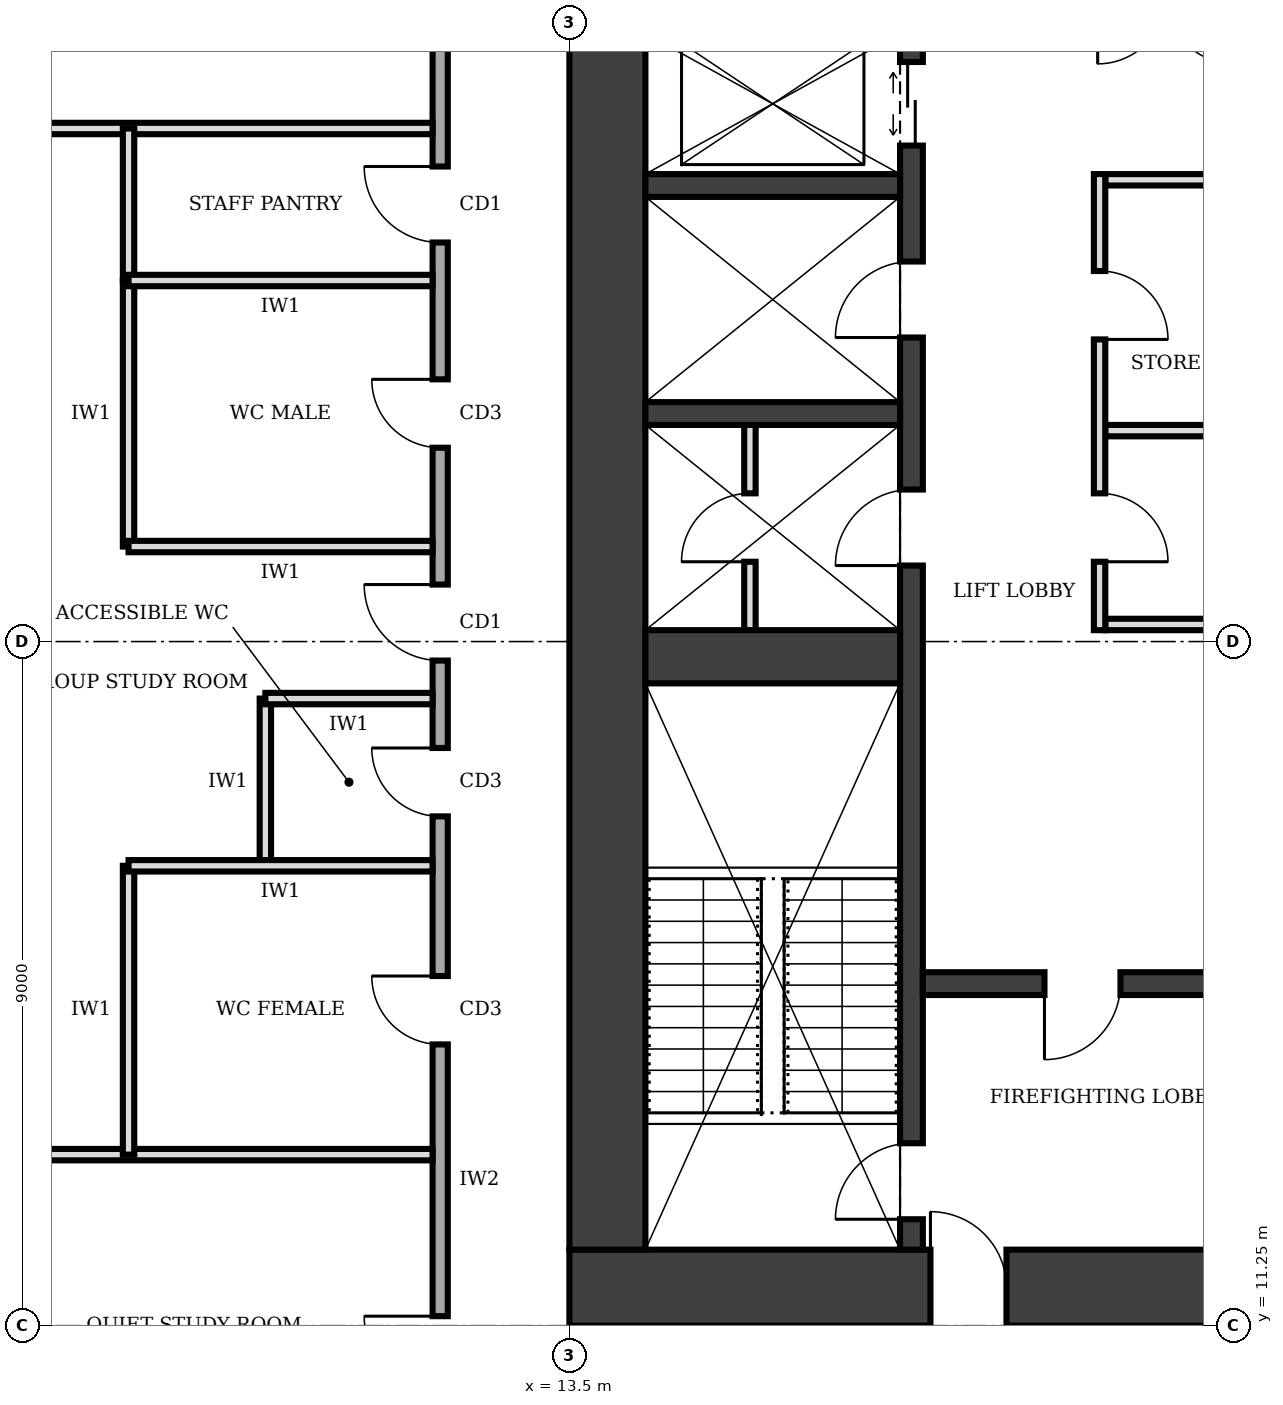
"""IFC4 building model, lengths in metres.
Left out: names, types, materials, properties, quantities, classifications, styles, units other than length and angle.
Written with IfcOpenShell. Run it as: python <this file> out.ifc"""

import sys

from ifc_helpers import new_model, si_unit, direction, frame, frame_2d, origin, place, context, subcontext, project, spatial, rectangle, extrude, element, fill, save


model = new_model("IFC4")
c1 = context("Model", 3, precision=1e-05, world=origin(), true_north=direction((0.0, 1.0)))
c2 = subcontext(c1, "Body", "Model", "MODEL_VIEW")
j1 = project(units=[si_unit("LENGTHUNIT", "METRE"), si_unit("PLANEANGLEUNIT", "RADIAN")], contexts=[c1])
p1 = place(None, origin())
s1 = spatial("IfcSite", under=j1, at=p1, CompositionType="ELEMENT")
p2 = place(p1, origin())
s2 = spatial("IfcBuilding", under=s1, at=p2, CompositionType="ELEMENT")
p3 = place(p2, frame((0.0, 0.0, 269.0)))
s3 = spatial("IfcBuildingStorey", under=s2, at=p3, CompositionType="ELEMENT", Elevation=269.0)
p4 = place(p3, frame((13.5, 11.75, 0.0), z_axis=(0.0, 0.0, 1.0), x_axis=(1.0, 0.0, 0.0)))
e1 = element("IfcWall", 1, at=p4, inside=s3, PredefinedType="SHEAR", context=c2, shape_type="SweptSolid", body=[
    extrude(rectangle(XDim=13.5, YDim=1.0, at=frame_2d((6.75, 0.0))), origin(), (0.0, 0.0, 1.0), 4.0),
])
p5 = place(p4, frame((4.75, 0.0, 0.0)))
e2 = element("IfcOpeningElement", 2, at=p5, cuts=e1, PredefinedType="OPENING", context=c2, shape_type="SweptSolid", body=[
    extrude(rectangle(XDim=1.0, YDim=2.1, at=frame_2d((0.5, 1.05))), frame((0.0, 0.51, 0.0), z_axis=(0.0, -1.0, 0.0), x_axis=(1.0, 0.0, 0.0)), (0.0, 0.0, 1.0), 1.02),
])
p6 = place(p3, frame((14.0, 28.25, 0.0), z_axis=(0.0, 0.0, 1.0), x_axis=(0.0, -1.0, 0.0)))
e3 = element("IfcWall", 3, at=p6, inside=s3, PredefinedType="SHEAR", context=c2, shape_type="SweptSolid", body=[
    extrude(rectangle(XDim=16.0, YDim=1.0, at=frame_2d((8.0, 0.0))), origin(), (0.0, 0.0, 1.0), 4.0),
])
p7 = place(p3, frame((18.0, 12.25, 0.0), z_axis=(0.0, 0.0, 1.0), x_axis=(0.0, 1.0, 0.0)))
e4 = element("IfcWall", 4, at=p7, inside=s3, PredefinedType="SHEAR", context=c2, shape_type="SweptSolid", body=[
    extrude(rectangle(XDim=16.0, YDim=0.3, at=frame_2d((8.0, 0.0))), origin(), (0.0, 0.0, 1.0), 4.0),
])
p8 = place(p7, frame((0.4, 0.0, 0.0)))
e5 = element("IfcOpeningElement", 5, at=p8, cuts=e4, PredefinedType="OPENING", context=c2, shape_type="SweptSolid", body=[
    extrude(rectangle(XDim=1.0, YDim=2.1, at=frame_2d((0.5, 1.05))), frame((0.0, 0.16, 0.0), z_axis=(0.0, -1.0, 0.0), x_axis=(1.0, 0.0, 0.0)), (0.0, 0.0, 1.0), 0.32),
])
p9 = place(p7, frame((14.525, 0.0, 0.0)))
e6 = element("IfcOpeningElement", 6, at=p9, cuts=e4, PredefinedType="OPENING", context=c2, shape_type="SweptSolid", body=[
    extrude(rectangle(XDim=1.1, YDim=2.1, at=frame_2d((0.55, 1.05))), frame((0.0, 0.16, 0.0), z_axis=(0.0, -1.0, 0.0), x_axis=(1.0, 0.0, 0.0)), (0.0, 0.0, 1.0), 0.32),
])
p10 = place(p7, frame((9.0, 0.0, 0.0)))
e7 = element("IfcOpeningElement", 7, at=p10, cuts=e4, PredefinedType="OPENING", context=c2, shape_type="SweptSolid", body=[
    extrude(rectangle(XDim=1.0, YDim=2.1, at=frame_2d((0.5, 1.05))), frame((0.0, 0.16, 0.0), z_axis=(0.0, -1.0, 0.0), x_axis=(1.0, 0.0, 0.0)), (0.0, 0.0, 1.0), 0.32),
])
p11 = place(p7, frame((12.0, 0.0, 0.0)))
e8 = element("IfcOpeningElement", 8, at=p11, cuts=e4, PredefinedType="OPENING", context=c2, shape_type="SweptSolid", body=[
    extrude(rectangle(XDim=1.0, YDim=2.1, at=frame_2d((0.5, 1.05))), frame((0.0, 0.16, 0.0), z_axis=(0.0, -1.0, 0.0), x_axis=(1.0, 0.0, 0.0)), (0.0, 0.0, 1.0), 0.32),
])
p12 = place(p3, frame((14.5, 20.05, 0.0), z_axis=(0.0, 0.0, 1.0), x_axis=(1.0, 0.0, 0.0)))
e9 = element("IfcWall", 9, at=p12, inside=s3, PredefinedType="SHEAR", context=c2, shape_type="SweptSolid", body=[
    extrude(rectangle(XDim=3.35, YDim=0.7, at=frame_2d((1.675, 0.0))), origin(), (0.0, 0.0, 1.0), 4.0),
])
p13 = place(p3, frame((18.15, 15.75, 0.0), z_axis=(0.0, 0.0, 1.0), x_axis=(1.0, 0.0, 0.0)))
e10 = element("IfcWall", 10, at=p13, inside=s3, PredefinedType="SHEAR", context=c2, shape_type="SweptSolid", body=[
    extrude(rectangle(XDim=4.2, YDim=0.3, at=frame_2d((2.1, 0.0))), origin(), (0.0, 0.0, 1.0), 4.0),
])
p14 = place(p13, frame((1.6, 0.0, 0.0)))
e11 = element("IfcOpeningElement", 11, at=p14, cuts=e10, PredefinedType="OPENING", context=c2, shape_type="SweptSolid", body=[
    extrude(rectangle(XDim=1.0, YDim=2.1, at=frame_2d((0.5, 1.05))), frame((0.0, 0.16, 0.0), z_axis=(0.0, -1.0, 0.0), x_axis=(1.0, 0.0, 0.0)), (0.0, 0.0, 1.0), 0.32),
])
for number, where, z_axis, x_axis in (
    (12, (14.5, 23.25, 0.0), (0.0, 0.0, 1.0), (1.0, 0.0, 0.0)),
    (13, (14.5, 26.25, 0.0), (0.0, 0.0, 1.0), (1.0, 0.0, 0.0)),
):
    element("IfcWall", number, at=place(p3, frame(where, z_axis=z_axis, x_axis=x_axis)), inside=s3, PredefinedType="SHEAR", context=c2, shape_type="SweptSolid", body=[
        extrude(rectangle(XDim=3.35, YDim=0.3, at=frame_2d((1.675, 0.0))), origin(), (0.0, 0.0, 1.0), 4.0),
    ])
p15 = place(p3, frame((20.475, 20.4, 0.0), z_axis=(0.0, 0.0, 1.0), x_axis=(0.0, 1.0, 0.0)))
e14 = element("IfcWall", 14, at=p15, inside=s3, PredefinedType="PARTITIONING", context=c2, shape_type="SweptSolid", body=[
    extrude(rectangle(XDim=6.0, YDim=0.15, at=frame_2d((3.0, 0.0))), origin(), (0.0, 0.0, 1.0), 3.75),
])
p16 = place(p15, frame((0.9, 0.0, 0.0)))
e15 = element("IfcOpeningElement", 15, at=p16, cuts=e14, PredefinedType="OPENING", context=c2, shape_type="SweptSolid", body=[
    extrude(rectangle(XDim=0.9, YDim=2.1, at=frame_2d((0.45, 1.05))), frame((0.0, 0.085, 0.0), z_axis=(0.0, -1.0, 0.0), x_axis=(1.0, 0.0, 0.0)), (0.0, 0.0, 1.0), 0.17),
])
p17 = place(p15, frame((3.825, 0.0, 0.0)))
e16 = element("IfcOpeningElement", 16, at=p17, cuts=e14, PredefinedType="OPENING", context=c2, shape_type="SweptSolid", body=[
    extrude(rectangle(XDim=0.9, YDim=2.1, at=frame_2d((0.45, 1.05))), frame((0.0, 0.085, 0.0), z_axis=(0.0, -1.0, 0.0), x_axis=(1.0, 0.0, 0.0)), (0.0, 0.0, 1.0), 0.17),
])
for number, where, z_axis, x_axis in (
    (17, (20.55, 20.475, 0.0), (0.0, 0.0, 1.0), (1.0, 0.0, 0.0)),
    (18, (20.55, 23.025, 0.0), (0.0, 0.0, 1.0), (1.0, 0.0, 0.0)),
    (19, (20.55, 26.325, 0.0), (0.0, 0.0, 1.0), (1.0, 0.0, 0.0)),
):
    element("IfcWall", number, at=place(p3, frame(where, z_axis=z_axis, x_axis=x_axis)), inside=s3, PredefinedType="PARTITIONING", context=c2, shape_type="SweptSolid", body=[
        extrude(rectangle(XDim=1.8, YDim=0.15, at=frame_2d((0.9, 0.0))), origin(), (0.0, 0.0, 1.0), 3.75),
    ])
p18 = place(p3, frame((15.875, 20.4, 0.0), z_axis=(0.0, 0.0, 1.0), x_axis=(0.0, 1.0, 0.0)))
e20 = element("IfcWall", 20, at=p18, inside=s3, PredefinedType="PARTITIONING", context=c2, shape_type="SweptSolid", body=[
    extrude(rectangle(XDim=2.7, YDim=0.15, at=frame_2d((1.35, 0.0))), origin(), (0.0, 0.0, 1.0), 3.75),
])
p19 = place(p18, frame((0.9, 0.0, 0.0)))
e21 = element("IfcOpeningElement", 21, at=p19, cuts=e20, PredefinedType="OPENING", context=c2, shape_type="SweptSolid", body=[
    extrude(rectangle(XDim=0.9, YDim=2.1, at=frame_2d((0.45, 1.05))), frame((0.0, 0.085, 0.0), z_axis=(0.0, -1.0, 0.0), x_axis=(1.0, 0.0, 0.0)), (0.0, 0.0, 1.0), 0.17),
])
p20 = place(p3, frame((11.8, 32.05, 0.0), z_axis=(0.0, 0.0, 1.0), x_axis=(0.0, -1.0, 0.0)))
e22 = element("IfcWall", 22, at=p20, inside=s3, PredefinedType="SOLIDWALL", context=c2, shape_type="SweptSolid", body=[
    extrude(rectangle(XDim=23.8, YDim=0.2, at=frame_2d((11.9, 0.0))), origin(), (0.0, 0.0, 1.0), 3.75),
])
p21 = place(p20, frame((20.675, 0.0, 0.0)))
e23 = element("IfcOpeningElement", 23, at=p21, cuts=e22, PredefinedType="OPENING", context=c2, shape_type="SweptSolid", body=[
    extrude(rectangle(XDim=1.0, YDim=2.1, at=frame_2d((0.5, 1.05))), frame((0.0, 0.11, 0.0), z_axis=(0.0, -1.0, 0.0), x_axis=(1.0, 0.0, 0.0)), (0.0, 0.0, 1.0), 0.22),
])
p22 = place(p20, frame((16.2, 0.0, 0.0)))
e24 = element("IfcOpeningElement", 24, at=p22, cuts=e22, PredefinedType="OPENING", context=c2, shape_type="SweptSolid", body=[
    extrude(rectangle(XDim=0.9, YDim=2.1, at=frame_2d((0.45, 1.05))), frame((0.0, 0.11, 0.0), z_axis=(0.0, -1.0, 0.0), x_axis=(1.0, 0.0, 0.0)), (0.0, 0.0, 1.0), 0.22),
])
p23 = place(p20, frame((13.2, 0.0, 0.0)))
e25 = element("IfcOpeningElement", 25, at=p23, cuts=e22, PredefinedType="OPENING", context=c2, shape_type="SweptSolid", body=[
    extrude(rectangle(XDim=0.9, YDim=2.1, at=frame_2d((0.45, 1.05))), frame((0.0, 0.11, 0.0), z_axis=(0.0, -1.0, 0.0), x_axis=(1.0, 0.0, 0.0)), (0.0, 0.0, 1.0), 0.22),
])
p24 = place(p20, frame((8.35, 0.0, 0.0)))
e26 = element("IfcOpeningElement", 26, at=p24, cuts=e22, PredefinedType="OPENING", context=c2, shape_type="SweptSolid", body=[
    extrude(rectangle(XDim=0.9, YDim=2.1, at=frame_2d((0.45, 1.05))), frame((0.0, 0.11, 0.0), z_axis=(0.0, -1.0, 0.0), x_axis=(1.0, 0.0, 0.0)), (0.0, 0.0, 1.0), 0.22),
])
p25 = place(p20, frame((5.55, 0.0, 0.0)))
e27 = element("IfcOpeningElement", 27, at=p25, cuts=e22, PredefinedType="OPENING", context=c2, shape_type="SweptSolid", body=[
    extrude(rectangle(XDim=1.0, YDim=2.1, at=frame_2d((0.5, 1.05))), frame((0.0, 0.11, 0.0), z_axis=(0.0, -1.0, 0.0), x_axis=(1.0, 0.0, 0.0)), (0.0, 0.0, 1.0), 0.22),
])
p26 = place(p20, frame((11.05, 0.0, 0.0)))
e28 = element("IfcOpeningElement", 28, at=p26, cuts=e22, PredefinedType="OPENING", context=c2, shape_type="SweptSolid", body=[
    extrude(rectangle(XDim=1.0, YDim=2.1, at=frame_2d((0.5, 1.05))), frame((0.0, 0.11, 0.0), z_axis=(0.0, -1.0, 0.0), x_axis=(1.0, 0.0, 0.0)), (0.0, 0.0, 1.0), 0.22),
])
p27 = place(p20, frame((1.925, 0.0, 0.0)))
e29 = element("IfcOpeningElement", 29, at=p27, cuts=e22, PredefinedType="OPENING", context=c2, shape_type="SweptSolid", body=[
    extrude(rectangle(XDim=1.0, YDim=2.1, at=frame_2d((0.5, 1.05))), frame((0.0, 0.11, 0.0), z_axis=(0.0, -1.0, 0.0), x_axis=(1.0, 0.0, 0.0)), (0.0, 0.0, 1.0), 0.22),
])
for number, where, z_axis, x_axis in (
    (30, (0.18, 13.5, 0.0), (0.0, 0.0, 1.0), (1.0, 0.0, 0.0)),
    (31, (0.18, 27.0, 0.0), (0.0, 0.0, 1.0), (1.0, 0.0, 0.0)),
):
    element("IfcWall", number, at=place(p3, frame(where, z_axis=z_axis, x_axis=x_axis)), inside=s3, PredefinedType="PARTITIONING", context=c2, shape_type="SweptSolid", body=[
        extrude(rectangle(XDim=11.52, YDim=0.15, at=frame_2d((5.76, 0.0))), origin(), (0.0, 0.0, 1.0), 3.75),
    ])
p28 = place(p3, frame((11.7, 17.3, 0.0), z_axis=(0.0, 0.0, 1.0), x_axis=(-1.0, 0.0, 0.0)))
e32 = element("IfcWall", 32, at=p28, inside=s3, PredefinedType="PARTITIONING", context=c2, shape_type="SweptSolid", body=[
    extrude(rectangle(XDim=4.0, YDim=0.15, at=frame_2d((2.0, 0.0))), origin(), (0.0, 0.0, 1.0), 3.75),
])
p29 = place(p3, frame((11.7, 19.5, 0.0), z_axis=(0.0, 0.0, 1.0), x_axis=(-1.0, 0.0, 0.0)))
e33 = element("IfcWall", 33, at=p29, inside=s3, PredefinedType="PARTITIONING", context=c2, shape_type="SweptSolid", body=[
    extrude(rectangle(XDim=2.2, YDim=0.15, at=frame_2d((1.1, 0.0))), origin(), (0.0, 0.0, 1.0), 2.85),
])
for number, where, z_axis, x_axis in (
    (34, (11.7, 21.5, 0.0), (0.0, 0.0, 1.0), (-1.0, 0.0, 0.0)),
    (35, (11.7, 25.0, 0.0), (0.0, 0.0, 1.0), (-1.0, 0.0, 0.0)),
):
    element("IfcWall", number, at=place(p3, frame(where, z_axis=z_axis, x_axis=x_axis)), inside=s3, PredefinedType="PARTITIONING", context=c2, shape_type="SweptSolid", body=[
        extrude(rectangle(XDim=4.0, YDim=0.15, at=frame_2d((2.0, 0.0))), origin(), (0.0, 0.0, 1.0), 3.75),
    ])
p30 = place(p3, frame((7.7, 13.5, 0.0), z_axis=(0.0, 0.0, 1.0), x_axis=(0.0, 1.0, 0.0)))
e36 = element("IfcWall", 36, at=p30, inside=s3, PredefinedType="PARTITIONING", context=c2, shape_type="SweptSolid", body=[
    extrude(rectangle(XDim=3.8, YDim=0.15, at=frame_2d((1.9, 0.0))), origin(), (0.0, 0.0, 1.0), 3.75),
])
p31 = place(p3, frame((9.5, 17.3, 0.0), z_axis=(0.0, 0.0, 1.0), x_axis=(0.0, 1.0, 0.0)))
e37 = element("IfcWall", 37, at=p31, inside=s3, PredefinedType="PARTITIONING", context=c2, shape_type="SweptSolid", body=[
    extrude(rectangle(XDim=2.2, YDim=0.15, at=frame_2d((1.1, 0.0))), origin(), (0.0, 0.0, 1.0), 3.75),
])
p32 = place(p3, frame((7.7, 21.5, 0.0), z_axis=(0.0, 0.0, 1.0), x_axis=(0.0, 1.0, 0.0)))
e38 = element("IfcWall", 38, at=p32, inside=s3, PredefinedType="PARTITIONING", context=c2, shape_type="SweptSolid", body=[
    extrude(rectangle(XDim=3.5, YDim=0.15, at=frame_2d((1.75, 0.0))), origin(), (0.0, 0.0, 1.0), 3.75),
])
p33 = place(p3, frame((7.7, 25.0, 0.0), z_axis=(0.0, 0.0, 1.0), x_axis=(0.0, 1.0, 0.0)))
e39 = element("IfcWall", 39, at=p33, inside=s3, PredefinedType="PARTITIONING", context=c2, shape_type="SweptSolid", body=[
    extrude(rectangle(XDim=2.0, YDim=0.15, at=frame_2d((1.0, 0.0))), origin(), (0.0, 0.0, 1.0), 3.75),
])
p34 = place(p5, origin())
e40 = element("IfcDoor", 40, at=p34, inside=s3, OperationType="SINGLE_SWING_LEFT", PredefinedType="DOOR", context=c2, shape_type="SweptSolid", body=[
    extrude(rectangle(XDim=1.0, YDim=2.1, at=frame_2d((0.5, 1.05))), frame((0.0, 0.025, 0.0), z_axis=(0.0, -1.0, 0.0), x_axis=(1.0, 0.0, 0.0)), (0.0, 0.0, 1.0), 0.05),
])
fill(e2, e40)
p35 = place(p14, frame((1.0, 0.0, 0.0), z_axis=(0.0, 0.0, 1.0), x_axis=(-1.0, 0.0, 0.0)))
e41 = element("IfcDoor", 41, at=p35, inside=s3, OperationType="SINGLE_SWING_RIGHT", PredefinedType="DOOR", context=c2, shape_type="SweptSolid", body=[
    extrude(rectangle(XDim=1.0, YDim=2.1, at=frame_2d((0.5, 1.05))), frame((0.0, 0.025, 0.0), z_axis=(0.0, -1.0, 0.0), x_axis=(1.0, 0.0, 0.0)), (0.0, 0.0, 1.0), 0.05),
])
fill(e11, e41)
p36 = place(p8, origin())
e42 = element("IfcDoor", 42, at=p36, inside=s3, OperationType="SINGLE_SWING_LEFT", PredefinedType="DOOR", context=c2, shape_type="SweptSolid", body=[
    extrude(rectangle(XDim=1.0, YDim=2.1, at=frame_2d((0.5, 1.05))), frame((0.0, 0.025, 0.0), z_axis=(0.0, -1.0, 0.0), x_axis=(1.0, 0.0, 0.0)), (0.0, 0.0, 1.0), 0.05),
])
fill(e5, e42)
p37 = place(p9, origin())
e43 = element("IfcDoor", 43, at=p37, inside=s3, OperationType="DOUBLE_DOOR_SLIDING", PredefinedType="DOOR", context=c2, shape_type="SweptSolid", body=[
    extrude(rectangle(XDim=1.1, YDim=2.1, at=frame_2d((0.55, 1.05))), frame((0.0, 0.025, 0.0), z_axis=(0.0, -1.0, 0.0), x_axis=(1.0, 0.0, 0.0)), (0.0, 0.0, 1.0), 0.05),
])
fill(e6, e43)
p38 = place(p16, frame((0.9, 0.0, 0.0), z_axis=(0.0, 0.0, 1.0), x_axis=(-1.0, 0.0, 0.0)))
e44 = element("IfcDoor", 44, at=p38, inside=s3, OperationType="SINGLE_SWING_RIGHT", PredefinedType="DOOR", context=c2, shape_type="SweptSolid", body=[
    extrude(rectangle(XDim=0.9, YDim=2.1, at=frame_2d((0.45, 1.05))), frame((0.0, 0.025, 0.0), z_axis=(0.0, -1.0, 0.0), x_axis=(1.0, 0.0, 0.0)), (0.0, 0.0, 1.0), 0.05),
])
fill(e15, e44)
p39 = place(p17, frame((0.9, 0.0, 0.0), z_axis=(0.0, 0.0, 1.0), x_axis=(-1.0, 0.0, 0.0)))
e45 = element("IfcDoor", 45, at=p39, inside=s3, OperationType="SINGLE_SWING_RIGHT", PredefinedType="DOOR", context=c2, shape_type="SweptSolid", body=[
    extrude(rectangle(XDim=0.9, YDim=2.1, at=frame_2d((0.45, 1.05))), frame((0.0, 0.025, 0.0), z_axis=(0.0, -1.0, 0.0), x_axis=(1.0, 0.0, 0.0)), (0.0, 0.0, 1.0), 0.05),
])
fill(e16, e45)
p40 = place(p10, origin())
e46 = element("IfcDoor", 46, at=p40, inside=s3, OperationType="SINGLE_SWING_LEFT", PredefinedType="DOOR", context=c2, shape_type="SweptSolid", body=[
    extrude(rectangle(XDim=1.0, YDim=2.1, at=frame_2d((0.5, 1.05))), frame((0.0, 0.025, 0.0), z_axis=(0.0, -1.0, 0.0), x_axis=(1.0, 0.0, 0.0)), (0.0, 0.0, 1.0), 0.05),
])
fill(e7, e46)
p41 = place(p19, origin())
e47 = element("IfcDoor", 47, at=p41, inside=s3, OperationType="SINGLE_SWING_LEFT", PredefinedType="DOOR", context=c2, shape_type="SweptSolid", body=[
    extrude(rectangle(XDim=0.9, YDim=2.1, at=frame_2d((0.45, 1.05))), frame((0.0, 0.025, 0.0), z_axis=(0.0, -1.0, 0.0), x_axis=(1.0, 0.0, 0.0)), (0.0, 0.0, 1.0), 0.05),
])
fill(e21, e47)
p42 = place(p11, origin())
e48 = element("IfcDoor", 48, at=p42, inside=s3, OperationType="SINGLE_SWING_LEFT", PredefinedType="DOOR", context=c2, shape_type="SweptSolid", body=[
    extrude(rectangle(XDim=1.0, YDim=2.1, at=frame_2d((0.5, 1.05))), frame((0.0, 0.025, 0.0), z_axis=(0.0, -1.0, 0.0), x_axis=(1.0, 0.0, 0.0)), (0.0, 0.0, 1.0), 0.05),
])
fill(e8, e48)
p43 = place(p21, frame((1.0, 0.0, 0.0), z_axis=(0.0, 0.0, 1.0), x_axis=(-1.0, 0.0, 0.0)))
e49 = element("IfcDoor", 49, at=p43, inside=s3, OperationType="SINGLE_SWING_RIGHT", PredefinedType="DOOR", context=c2, shape_type="SweptSolid", body=[
    extrude(rectangle(XDim=1.0, YDim=2.1, at=frame_2d((0.5, 1.05))), frame((0.0, 0.025, 0.0), z_axis=(0.0, -1.0, 0.0), x_axis=(1.0, 0.0, 0.0)), (0.0, 0.0, 1.0), 0.05),
])
fill(e23, e49)
p44 = place(p22, frame((0.9, 0.0, 0.0), z_axis=(0.0, 0.0, 1.0), x_axis=(-1.0, 0.0, 0.0)))
e50 = element("IfcDoor", 50, at=p44, inside=s3, OperationType="SINGLE_SWING_RIGHT", PredefinedType="DOOR", context=c2, shape_type="SweptSolid", body=[
    extrude(rectangle(XDim=0.9, YDim=2.1, at=frame_2d((0.45, 1.05))), frame((0.0, 0.025, 0.0), z_axis=(0.0, -1.0, 0.0), x_axis=(1.0, 0.0, 0.0)), (0.0, 0.0, 1.0), 0.05),
])
fill(e24, e50)
p45 = place(p23, frame((0.9, 0.0, 0.0), z_axis=(0.0, 0.0, 1.0), x_axis=(-1.0, 0.0, 0.0)))
e51 = element("IfcDoor", 51, at=p45, inside=s3, OperationType="SINGLE_SWING_RIGHT", PredefinedType="DOOR", context=c2, shape_type="SweptSolid", body=[
    extrude(rectangle(XDim=0.9, YDim=2.1, at=frame_2d((0.45, 1.05))), frame((0.0, 0.025, 0.0), z_axis=(0.0, -1.0, 0.0), x_axis=(1.0, 0.0, 0.0)), (0.0, 0.0, 1.0), 0.05),
])
fill(e25, e51)
p46 = place(p24, frame((0.9, 0.0, 0.0), z_axis=(0.0, 0.0, 1.0), x_axis=(-1.0, 0.0, 0.0)))
e52 = element("IfcDoor", 52, at=p46, inside=s3, OperationType="SINGLE_SWING_RIGHT", PredefinedType="DOOR", context=c2, shape_type="SweptSolid", body=[
    extrude(rectangle(XDim=0.9, YDim=2.1, at=frame_2d((0.45, 1.05))), frame((0.0, 0.025, 0.0), z_axis=(0.0, -1.0, 0.0), x_axis=(1.0, 0.0, 0.0)), (0.0, 0.0, 1.0), 0.05),
])
fill(e26, e52)
p47 = place(p25, frame((1.0, 0.0, 0.0), z_axis=(0.0, 0.0, 1.0), x_axis=(-1.0, 0.0, 0.0)))
e53 = element("IfcDoor", 53, at=p47, inside=s3, OperationType="SINGLE_SWING_RIGHT", PredefinedType="DOOR", context=c2, shape_type="SweptSolid", body=[
    extrude(rectangle(XDim=1.0, YDim=2.1, at=frame_2d((0.5, 1.05))), frame((0.0, 0.025, 0.0), z_axis=(0.0, -1.0, 0.0), x_axis=(1.0, 0.0, 0.0)), (0.0, 0.0, 1.0), 0.05),
])
fill(e27, e53)
p48 = place(p26, frame((1.0, 0.0, 0.0), z_axis=(0.0, 0.0, 1.0), x_axis=(-1.0, 0.0, 0.0)))
e54 = element("IfcDoor", 54, at=p48, inside=s3, OperationType="SINGLE_SWING_RIGHT", PredefinedType="DOOR", context=c2, shape_type="SweptSolid", body=[
    extrude(rectangle(XDim=1.0, YDim=2.1, at=frame_2d((0.5, 1.05))), frame((0.0, 0.025, 0.0), z_axis=(0.0, -1.0, 0.0), x_axis=(1.0, 0.0, 0.0)), (0.0, 0.0, 1.0), 0.05),
])
fill(e28, e54)
save(model, sys.argv[1])
